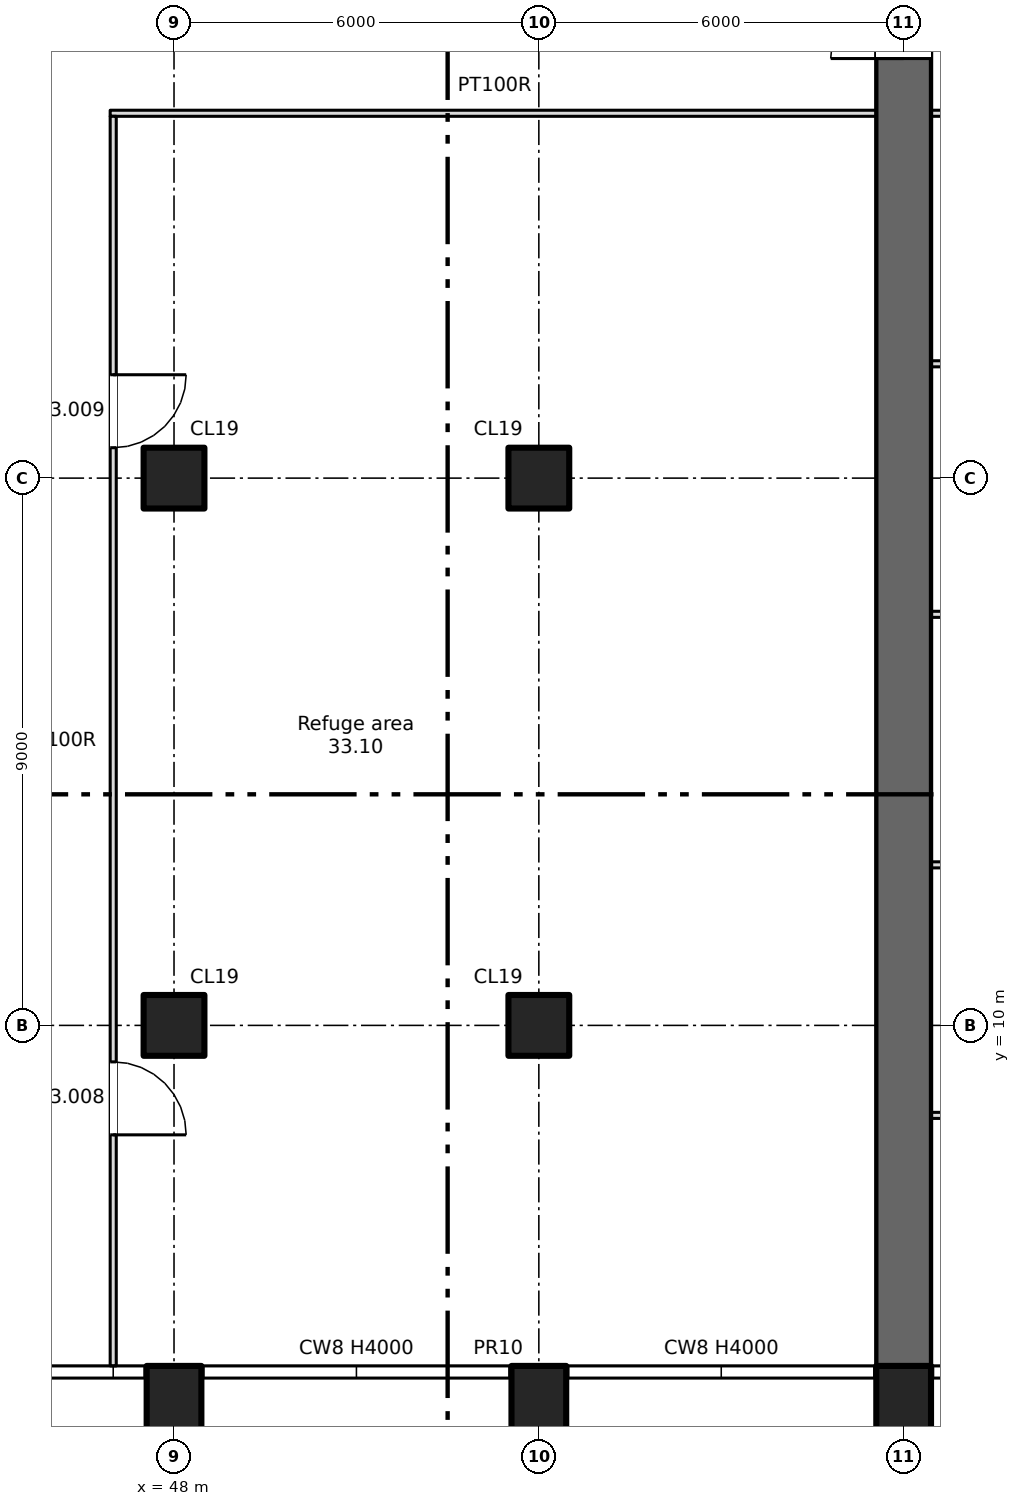
"""IFC4 building model, lengths in metres.
Left out: names, types, materials, properties, quantities, classifications, styles, units other than length and angle.
Written with IfcOpenShell. Run it as: python <this file> out.ifc"""

import sys

from ifc_helpers import new_model, si_unit, direction, frame, frame_2d, origin, origin_2d, place, context, subcontext, project, spatial, rectangle, extrude, element, fill, save


model = new_model("IFC4")
c1 = context("Model", 3, precision=1e-05, world=origin(), true_north=direction((0.0, 1.0)))
c2 = subcontext(c1, "Body", "Model", "MODEL_VIEW")
j1 = project(units=[si_unit("LENGTHUNIT", "METRE"), si_unit("PLANEANGLEUNIT", "RADIAN")], contexts=[c1])
p1 = place(None, origin())
s1 = spatial("IfcSite", under=j1, at=p1, CompositionType="ELEMENT")
p2 = place(p1, origin())
s2 = spatial("IfcBuilding", under=s1, at=p2, CompositionType="ELEMENT")
p3 = place(p2, frame((0.0, 0.0, 226.75)))
s3 = spatial("IfcBuildingStorey", under=s2, at=p3, CompositionType="ELEMENT", Elevation=226.75)
for number, where, z_axis, x_axis in (
    (1, (48.0, 3.7, -0.6), (0.0, 0.0, 1.0), (1.0, 0.0, 0.0)),
    (2, (54.0, 3.7, -0.6), (0.0, 0.0, 1.0), (1.0, 0.0, 0.0)),
    (3, (60.0, 3.7, -0.6), (0.0, 0.0, 1.0), (1.0, 0.0, 0.0)),
):
    element("IfcColumn", number, at=place(p3, frame(where, z_axis=z_axis, x_axis=x_axis)), inside=s3, PredefinedType="COLUMN", context=c2, shape_type="SweptSolid", body=[
        extrude(rectangle(XDim=0.9, YDim=1.4, at=origin_2d()), origin(), (0.0, 0.0, 1.0), 4.8),
    ])
for number, where, z_axis, x_axis in (
    (4, (48.0, 10.0, 0.0), (0.0, 0.0, 1.0), (1.0, 0.0, 0.0)),
    (5, (48.0, 19.0, 0.0), (0.0, 0.0, 1.0), (1.0, 0.0, 0.0)),
    (6, (54.0, 10.0, 0.0), (0.0, 0.0, 1.0), (1.0, 0.0, 0.0)),
    (7, (54.0, 19.0, 0.0), (0.0, 0.0, 1.0), (1.0, 0.0, 0.0)),
):
    element("IfcColumn", number, at=place(p3, frame(where, z_axis=z_axis, x_axis=x_axis)), inside=s3, PredefinedType="COLUMN", context=c2, shape_type="SweptSolid", body=[
        extrude(rectangle(XDim=1.0, YDim=1.0, at=origin_2d()), origin(), (0.0, 0.0, 1.0), 4.2),
    ])
p4 = place(p3, frame((60.0, 4.4, 0.0), z_axis=(0.0, 0.0, 1.0), x_axis=(0.0, 1.0, 0.0)))
e8 = element("IfcWall", 8, at=p4, inside=s3, PredefinedType="SHEAR", context=c2, shape_type="SweptSolid", body=[
    extrude(rectangle(XDim=23.6, YDim=0.9, at=frame_2d((11.8, 0.0))), origin(), (0.0, 0.0, 1.0), 4.2),
])
p5 = place(p4, frame((21.5, 0.0, 0.0)))
e9 = element("IfcOpeningElement", 9, at=p5, cuts=e8, PredefinedType="OPENING", context=c2, shape_type="SweptSolid", body=[
    extrude(rectangle(XDim=1.2, YDim=2.1, at=frame_2d((0.6, 1.05))), frame((0.0, 0.46, 0.0), z_axis=(0.0, -1.0, 0.0), x_axis=(1.0, 0.0, 0.0)), (0.0, 0.0, 1.0), 0.92),
])
p6 = place(p3, frame((60.4, 8.52, 0.0), z_axis=(0.0, 0.0, 1.0), x_axis=(1.0, 0.0, 0.0)))
e10 = element("IfcWall", 10, at=p6, inside=s3, PredefinedType="PARTITIONING", context=c2, shape_type="SweptSolid", body=[
    extrude(rectangle(XDim=8.55, YDim=0.1, at=frame_2d((4.275, 0.0))), origin(), (0.0, 0.0, 1.0), 2.6),
])
p7 = place(p6, frame((3.8, 0.0, 0.0)))
e11 = element("IfcOpeningElement", 11, at=p7, cuts=e10, PredefinedType="OPENING", context=c2, shape_type="SweptSolid", body=[
    extrude(rectangle(XDim=1.0, YDim=2.1, at=frame_2d((0.5, 1.05))), frame((0.0, 0.06, 0.0), z_axis=(0.0, -1.0, 0.0), x_axis=(1.0, 0.0, 0.0)), (0.0, 0.0, 1.0), 0.12),
])
for number, where, z_axis, x_axis in (
    (12, (60.4, 12.64, 0.0), (0.0, 0.0, 1.0), (1.0, 0.0, 0.0)),
    (13, (60.4, 16.76, 0.0), (0.0, 0.0, 1.0), (1.0, 0.0, 0.0)),
):
    element("IfcWall", number, at=place(p3, frame(where, z_axis=z_axis, x_axis=x_axis)), inside=s3, PredefinedType="PARTITIONING", context=c2, shape_type="SweptSolid", body=[
        extrude(rectangle(XDim=8.55, YDim=0.1, at=frame_2d((4.275, 0.0))), origin(), (0.0, 0.0, 1.0), 2.4),
    ])
p8 = place(p3, frame((60.4, 20.88, 0.0), z_axis=(0.0, 0.0, 1.0), x_axis=(1.0, 0.0, 0.0)))
e14 = element("IfcWall", 14, at=p8, inside=s3, PredefinedType="PARTITIONING", context=c2, shape_type="SweptSolid", body=[
    extrude(rectangle(XDim=8.55, YDim=0.1, at=frame_2d((4.275, 0.0))), origin(), (0.0, 0.0, 1.0), 4.2),
])
p9 = place(p3, frame((46.95, 25.0, 0.0), z_axis=(0.0, 0.0, 1.0), x_axis=(1.0, 0.0, 0.0)))
e15 = element("IfcWall", 15, at=p9, inside=s3, PredefinedType="PARTITIONING", context=c2, shape_type="SweptSolid", body=[
    extrude(rectangle(XDim=12.65, YDim=0.1, at=frame_2d((6.325, 0.0))), origin(), (0.0, 0.0, 1.0), 4.2),
])
p10 = place(p3, frame((60.4, 25.0, 0.0), z_axis=(0.0, 0.0, 1.0), x_axis=(1.0, 0.0, 0.0)))
e16 = element("IfcWall", 16, at=p10, inside=s3, PredefinedType="PARTITIONING", context=c2, shape_type="SweptSolid", body=[
    extrude(rectangle(XDim=8.65, YDim=0.1, at=frame_2d((4.325, 0.0))), origin(), (0.0, 0.0, 1.0), 4.2),
])
p11 = place(p10, frame((3.8, 0.0, 0.0)))
e17 = element("IfcOpeningElement", 17, at=p11, cuts=e16, PredefinedType="OPENING", context=c2, shape_type="SweptSolid", body=[
    extrude(rectangle(XDim=1.0, YDim=2.1, at=frame_2d((0.5, 1.05))), frame((0.0, 0.06, 0.0), z_axis=(0.0, -1.0, 0.0), x_axis=(1.0, 0.0, 0.0)), (0.0, 0.0, 1.0), 0.12),
])
p12 = place(p3, frame((47.0, 4.4, 0.0), z_axis=(0.0, 0.0, 1.0), x_axis=(0.0, 1.0, 0.0)))
e18 = element("IfcWall", 18, at=p12, inside=s3, PredefinedType="PARTITIONING", context=c2, shape_type="SweptSolid", body=[
    extrude(rectangle(XDim=20.55, YDim=0.1, at=frame_2d((10.275, 0.0))), origin(), (0.0, 0.0, 1.0), 4.2),
])
p13 = place(p12, frame((3.8, 0.0, 0.0)))
e19 = element("IfcOpeningElement", 19, at=p13, cuts=e18, PredefinedType="OPENING", context=c2, shape_type="SweptSolid", body=[
    extrude(rectangle(XDim=1.2, YDim=2.1, at=frame_2d((0.6, 1.05))), frame((0.0, 0.06, 0.0), z_axis=(0.0, -1.0, 0.0), x_axis=(1.0, 0.0, 0.0)), (0.0, 0.0, 1.0), 0.12),
])
p14 = place(p12, frame((15.1, 0.0, 0.0)))
e20 = element("IfcOpeningElement", 20, at=p14, cuts=e18, PredefinedType="OPENING", context=c2, shape_type="SweptSolid", body=[
    extrude(rectangle(XDim=1.2, YDim=2.1, at=frame_2d((0.6, 1.05))), frame((0.0, 0.06, 0.0), z_axis=(0.0, -1.0, 0.0), x_axis=(1.0, 0.0, 0.0)), (0.0, 0.0, 1.0), 0.12),
])
p15 = place(p13, origin())
e21 = element("IfcDoor", 21, at=p15, inside=s3, OperationType="SINGLE_SWING_LEFT", PredefinedType="DOOR", context=c2, shape_type="SweptSolid", body=[
    extrude(rectangle(XDim=1.2, YDim=2.1, at=frame_2d((0.6, 1.05))), frame((0.0, 0.025, 0.0), z_axis=(0.0, -1.0, 0.0), x_axis=(1.0, 0.0, 0.0)), (0.0, 0.0, 1.0), 0.05),
])
fill(e19, e21)
p16 = place(p14, origin())
e22 = element("IfcDoor", 22, at=p16, inside=s3, OperationType="SINGLE_SWING_RIGHT", PredefinedType="DOOR", context=c2, shape_type="SweptSolid", body=[
    extrude(rectangle(XDim=1.2, YDim=2.1, at=frame_2d((0.6, 1.05))), frame((0.0, 0.025, 0.0), z_axis=(0.0, -1.0, 0.0), x_axis=(1.0, 0.0, 0.0)), (0.0, 0.0, 1.0), 0.05),
])
fill(e20, e22)
p17 = place(p5, origin())
e23 = element("IfcDoor", 23, at=p17, inside=s3, OperationType="SINGLE_SWING_LEFT", PredefinedType="DOOR", context=c2, shape_type="SweptSolid", body=[
    extrude(rectangle(XDim=1.2, YDim=2.1, at=frame_2d((0.6, 1.05))), frame((0.0, 0.025, 0.0), z_axis=(0.0, -1.0, 0.0), x_axis=(1.0, 0.0, 0.0)), (0.0, 0.0, 1.0), 0.05),
])
fill(e9, e23)
save(model, sys.argv[1])
